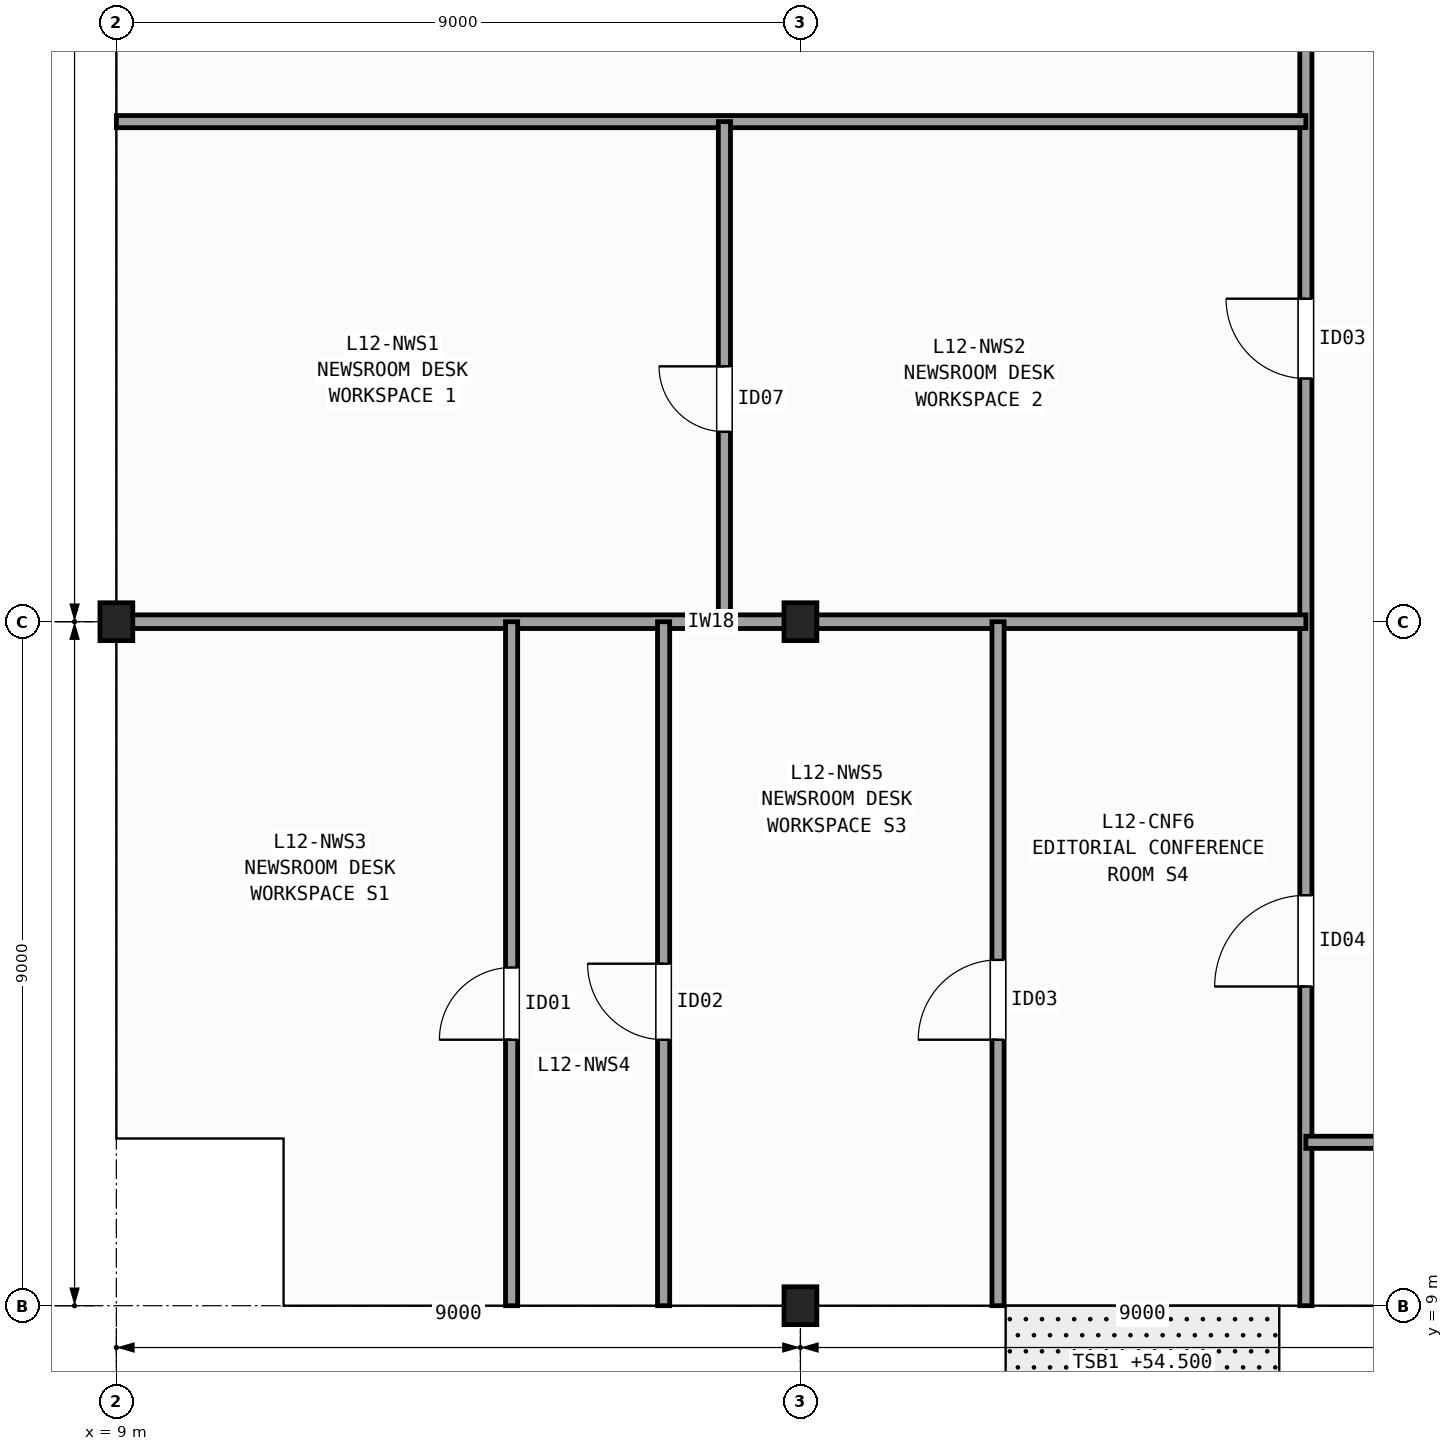
"""IFC4 building model, lengths in metres.
Left out: names, types, materials, properties, quantities, classifications, styles, units other than length and angle.
Written with IfcOpenShell. Run it as: python <this file> out.ifc"""

import sys

from ifc_helpers import new_model, si_unit, direction, frame, frame_2d, origin, origin_2d, place, context, subcontext, project, spatial, rectangle, i_section, extrude, element, fill, save


model = new_model("IFC4")
c1 = context("Model", 3, precision=1e-05, world=origin(), true_north=direction((0.0, 1.0)))
c2 = subcontext(c1, "Body", "Model", "MODEL_VIEW")
j1 = project(units=[si_unit("LENGTHUNIT", "METRE"), si_unit("PLANEANGLEUNIT", "RADIAN")], contexts=[c1])
p1 = place(None, origin())
s1 = spatial("IfcSite", under=j1, at=p1, CompositionType="ELEMENT")
p2 = place(p1, origin())
s2 = spatial("IfcBuilding", under=s1, at=p2, CompositionType="ELEMENT")
p3 = place(p2, frame((0.0, 0.0, 54.5)))
s3 = spatial("IfcBuildingStorey", under=s2, at=p3, CompositionType="ELEMENT", Elevation=54.5)
for number, where, z_axis, x_axis in (
    (1, (9.0, 18.0, 0.0), (0.0, 0.0, 1.0), (1.0, 0.0, 0.0)),
    (2, (18.0, 9.0, 0.0), (0.0, 0.0, 1.0), (1.0, 0.0, 0.0)),
    (3, (18.0, 18.0, 0.0), (0.0, 0.0, 1.0), (1.0, 0.0, 0.0)),
):
    element("IfcColumn", number, at=place(p3, frame(where, z_axis=z_axis, x_axis=x_axis)), inside=s3, PredefinedType="COLUMN", context=c2, shape_type="SweptSolid", body=[
        extrude(i_section(OverallWidth=0.432, OverallDepth=0.498, WebThickness=0.056, FlangeThickness=0.089, FilletRadius=0.015, at=origin_2d()), origin(), (0.0, 0.0, 1.0), 3.7),
    ])
p4 = place(p3, frame((24.65, 9.0, 0.0), z_axis=(0.0, 0.0, 1.0), x_axis=(0.0, 1.0, 0.0)))
e4 = element("IfcWall", 4, at=p4, inside=s3, PredefinedType="PARTITIONING", context=c2, shape_type="SweptSolid", body=[
    extrude(rectangle(XDim=19.2, YDim=0.16, at=frame_2d((9.6, 0.0))), origin(), (0.0, 0.0, 1.0), 2.627),
])
p5 = place(p4, frame((12.2, 0.0, 0.0)))
e5 = element("IfcOpeningElement", 5, at=p5, cuts=e4, PredefinedType="OPENING", context=c2, shape_type="SweptSolid", body=[
    extrude(rectangle(XDim=1.05, YDim=2.15, at=frame_2d((0.525, 1.075))), frame((0.0, 0.09, 0.0), z_axis=(0.0, -1.0, 0.0), x_axis=(1.0, 0.0, 0.0)), (0.0, 0.0, 1.0), 0.18),
])
p6 = place(p4, frame((4.2, 0.0, 0.0)))
e6 = element("IfcOpeningElement", 6, at=p6, cuts=e4, PredefinedType="OPENING", context=c2, shape_type="SweptSolid", body=[
    extrude(rectangle(XDim=1.2, YDim=2.15, at=frame_2d((0.6, 1.075))), frame((0.0, 0.09, 0.0), z_axis=(0.0, -1.0, 0.0), x_axis=(1.0, 0.0, 0.0)), (0.0, 0.0, 1.0), 0.18),
])
p7 = place(p3, frame((9.0, 24.58, 0.0), z_axis=(0.0, 0.0, 1.0), x_axis=(1.0, 0.0, 0.0)))
e7 = element("IfcWall", 7, at=p7, inside=s3, PredefinedType="PARTITIONING", context=c2, shape_type="SweptSolid", body=[
    extrude(rectangle(XDim=15.65, YDim=0.16, at=frame_2d((7.825, 0.0))), origin(), (0.0, 0.0, 1.0), 2.627),
])
p8 = place(p3, frame((9.0, 18.0, 0.0), z_axis=(0.0, 0.0, 1.0), x_axis=(1.0, 0.0, 0.0)))
e8 = element("IfcWall", 8, at=p8, inside=s3, PredefinedType="PARTITIONING", context=c2, shape_type="SweptSolid", body=[
    extrude(rectangle(XDim=15.65, YDim=0.18, at=frame_2d((7.825, 0.0))), origin(), (0.0, 0.0, 1.0), 2.627),
])
p9 = place(p3, frame((17.0, 18.0, 0.0), z_axis=(0.0, 0.0, 1.0), x_axis=(0.0, 1.0, 0.0)))
e9 = element("IfcWall", 9, at=p9, inside=s3, PredefinedType="PARTITIONING", context=c2, shape_type="SweptSolid", body=[
    extrude(rectangle(XDim=6.58, YDim=0.16, at=frame_2d((3.29, 0.0))), origin(), (0.0, 0.0, 1.0), 2.789),
])
p10 = place(p9, frame((2.5, 0.0, 0.0)))
e10 = element("IfcOpeningElement", 10, at=p10, cuts=e9, PredefinedType="OPENING", context=c2, shape_type="SweptSolid", body=[
    extrude(rectangle(XDim=0.86, YDim=2.05, at=frame_2d((0.43, 1.025))), frame((0.0, 0.09, 0.0), z_axis=(0.0, -1.0, 0.0), x_axis=(1.0, 0.0, 0.0)), (0.0, 0.0, 1.0), 0.18),
])
p11 = place(p3, frame((14.2, 9.0, 0.0), z_axis=(0.0, 0.0, 1.0), x_axis=(0.0, 1.0, 0.0)))
e11 = element("IfcWall", 11, at=p11, inside=s3, PredefinedType="PARTITIONING", context=c2, shape_type="SweptSolid", body=[
    extrude(rectangle(XDim=9.0, YDim=0.16, at=frame_2d((4.5, 0.0))), origin(), (0.0, 0.0, 1.0), 2.789),
])
p12 = place(p11, frame((3.5, 0.0, 0.0)))
e12 = element("IfcOpeningElement", 12, at=p12, cuts=e11, PredefinedType="OPENING", context=c2, shape_type="SweptSolid", body=[
    extrude(rectangle(XDim=0.95, YDim=2.1, at=frame_2d((0.475, 1.05))), frame((0.0, 0.09, 0.0), z_axis=(0.0, -1.0, 0.0), x_axis=(1.0, 0.0, 0.0)), (0.0, 0.0, 1.0), 0.18),
])
p13 = place(p3, frame((16.2, 9.0, 0.0), z_axis=(0.0, 0.0, 1.0), x_axis=(0.0, 1.0, 0.0)))
e13 = element("IfcWall", 13, at=p13, inside=s3, PredefinedType="PARTITIONING", context=c2, shape_type="SweptSolid", body=[
    extrude(rectangle(XDim=9.0, YDim=0.16, at=frame_2d((4.5, 0.0))), origin(), (0.0, 0.0, 1.0), 2.789),
])
p14 = place(p13, frame((3.5, 0.0, 0.0)))
e14 = element("IfcOpeningElement", 14, at=p14, cuts=e13, PredefinedType="OPENING", context=c2, shape_type="SweptSolid", body=[
    extrude(rectangle(XDim=1.0, YDim=2.1, at=frame_2d((0.5, 1.05))), frame((0.0, 0.09, 0.0), z_axis=(0.0, -1.0, 0.0), x_axis=(1.0, 0.0, 0.0)), (0.0, 0.0, 1.0), 0.18),
])
p15 = place(p3, frame((20.6, 9.0, 0.0), z_axis=(0.0, 0.0, 1.0), x_axis=(0.0, 1.0, 0.0)))
e15 = element("IfcWall", 15, at=p15, inside=s3, PredefinedType="PARTITIONING", context=c2, shape_type="SweptSolid", body=[
    extrude(rectangle(XDim=9.0, YDim=0.16, at=frame_2d((4.5, 0.0))), origin(), (0.0, 0.0, 1.0), 2.627),
])
p16 = place(p15, frame((3.5, 0.0, 0.0)))
e16 = element("IfcOpeningElement", 16, at=p16, cuts=e15, PredefinedType="OPENING", context=c2, shape_type="SweptSolid", body=[
    extrude(rectangle(XDim=1.05, YDim=2.15, at=frame_2d((0.525, 1.075))), frame((0.0, 0.09, 0.0), z_axis=(0.0, -1.0, 0.0), x_axis=(1.0, 0.0, 0.0)), (0.0, 0.0, 1.0), 0.18),
])
p17 = place(p3, frame((24.65, 11.15, 0.0), z_axis=(0.0, 0.0, 1.0), x_axis=(1.0, 0.0, 0.0)))
e17 = element("IfcWall", 17, at=p17, inside=s3, PredefinedType="PARTITIONING", context=c2, shape_type="SweptSolid", body=[
    extrude(rectangle(XDim=4.75, YDim=0.16, at=frame_2d((2.375, 0.0))), origin(), (0.0, 0.0, 1.0), 2.792),
])
p18 = place(p17, frame((1.2, 0.0, 0.0)))
e18 = element("IfcOpeningElement", 18, at=p18, cuts=e17, PredefinedType="OPENING", context=c2, shape_type="SweptSolid", body=[
    extrude(rectangle(XDim=1.0, YDim=2.1, at=frame_2d((0.5, 1.05))), frame((0.0, 0.09, 0.0), z_axis=(0.0, -1.0, 0.0), x_axis=(1.0, 0.0, 0.0)), (0.0, 0.0, 1.0), 0.18),
])
p19 = place(p5, origin())
e19 = element("IfcDoor", 19, at=p19, inside=s3, OperationType="SINGLE_SWING_RIGHT", PredefinedType="DOOR", context=c2, shape_type="SweptSolid", body=[
    extrude(rectangle(XDim=1.05, YDim=2.15, at=frame_2d((0.525, 1.075))), frame((0.0, 0.025, 0.0), z_axis=(0.0, -1.0, 0.0), x_axis=(1.0, 0.0, 0.0)), (0.0, 0.0, 1.0), 0.05),
])
fill(e5, e19)
p20 = place(p6, origin())
e20 = element("IfcDoor", 20, at=p20, inside=s3, OperationType="SINGLE_SWING_LEFT", PredefinedType="DOOR", context=c2, shape_type="SweptSolid", body=[
    extrude(rectangle(XDim=1.2, YDim=2.15, at=frame_2d((0.6, 1.075))), frame((0.0, 0.025, 0.0), z_axis=(0.0, -1.0, 0.0), x_axis=(1.0, 0.0, 0.0)), (0.0, 0.0, 1.0), 0.05),
])
fill(e6, e20)
p21 = place(p10, origin())
e21 = element("IfcDoor", 21, at=p21, inside=s3, OperationType="SINGLE_SWING_RIGHT", PredefinedType="DOOR", context=c2, shape_type="SweptSolid", body=[
    extrude(rectangle(XDim=0.86, YDim=2.05, at=frame_2d((0.43, 1.025))), frame((0.0, 0.025, 0.0), z_axis=(0.0, -1.0, 0.0), x_axis=(1.0, 0.0, 0.0)), (0.0, 0.0, 1.0), 0.05),
])
fill(e10, e21)
p22 = place(p12, origin())
e22 = element("IfcDoor", 22, at=p22, inside=s3, OperationType="SINGLE_SWING_LEFT", PredefinedType="DOOR", context=c2, shape_type="SweptSolid", body=[
    extrude(rectangle(XDim=0.95, YDim=2.1, at=frame_2d((0.475, 1.05))), frame((0.0, 0.025, 0.0), z_axis=(0.0, -1.0, 0.0), x_axis=(1.0, 0.0, 0.0)), (0.0, 0.0, 1.0), 0.05),
])
fill(e12, e22)
p23 = place(p14, origin())
e23 = element("IfcDoor", 23, at=p23, inside=s3, OperationType="SINGLE_SWING_RIGHT", PredefinedType="DOOR", context=c2, shape_type="SweptSolid", body=[
    extrude(rectangle(XDim=1.0, YDim=2.1, at=frame_2d((0.5, 1.05))), frame((0.0, 0.025, 0.0), z_axis=(0.0, -1.0, 0.0), x_axis=(1.0, 0.0, 0.0)), (0.0, 0.0, 1.0), 0.05),
])
fill(e14, e23)
p24 = place(p16, origin())
e24 = element("IfcDoor", 24, at=p24, inside=s3, OperationType="SINGLE_SWING_LEFT", PredefinedType="DOOR", context=c2, shape_type="SweptSolid", body=[
    extrude(rectangle(XDim=1.05, YDim=2.15, at=frame_2d((0.525, 1.075))), frame((0.0, 0.025, 0.0), z_axis=(0.0, -1.0, 0.0), x_axis=(1.0, 0.0, 0.0)), (0.0, 0.0, 1.0), 0.05),
])
fill(e16, e24)
save(model, sys.argv[1])
